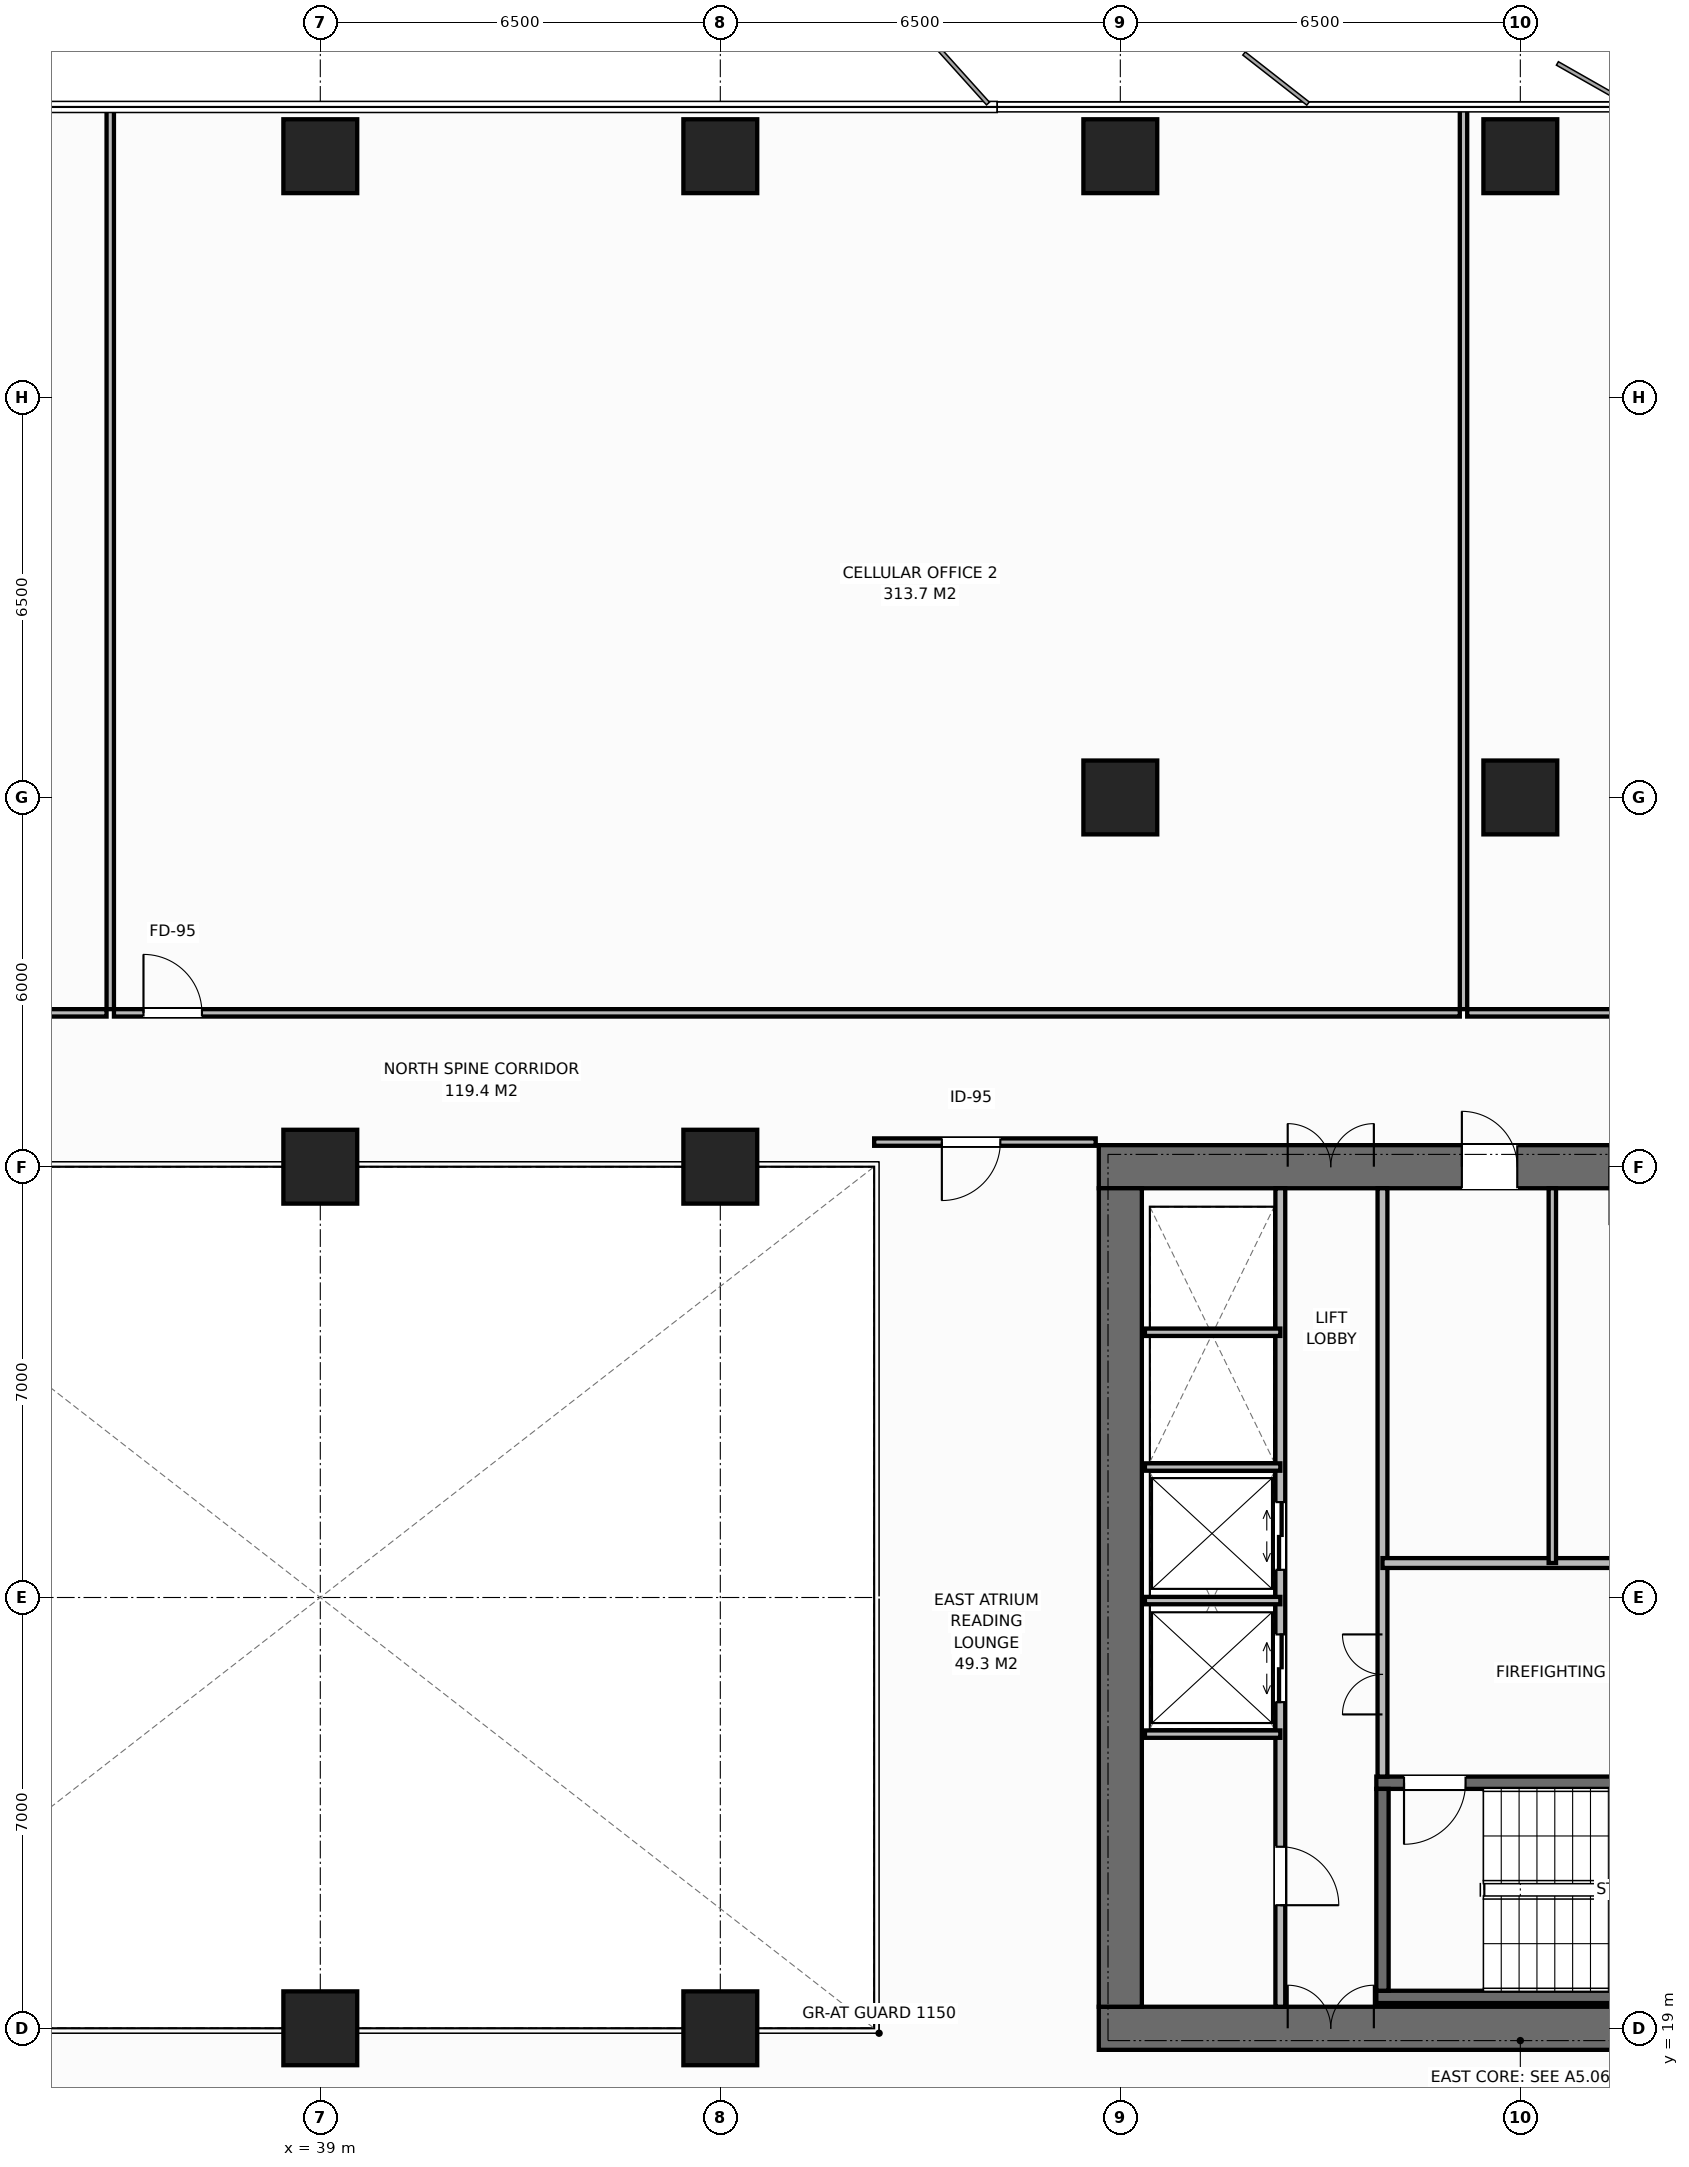
"""IFC4 building model, lengths in metres.
Left out: names, types, materials, properties, quantities, classifications, styles, units other than length and angle.
Written with IfcOpenShell. Run it as: python <this file> out.ifc"""

import sys

from ifc_helpers import new_model, si_unit, direction, frame, frame_2d, origin, origin_2d, place, context, subcontext, project, spatial, rectangle, extrude, element, fill, save


model = new_model("IFC4")
c1 = context("Model", 3, precision=1e-05, world=origin(), true_north=direction((0.0, 1.0)))
c2 = subcontext(c1, "Body", "Model", "MODEL_VIEW")
j1 = project(units=[si_unit("LENGTHUNIT", "METRE"), si_unit("PLANEANGLEUNIT", "RADIAN")], contexts=[c1])
p1 = place(None, origin())
s1 = spatial("IfcSite", under=j1, at=p1, CompositionType="ELEMENT")
p2 = place(p1, origin())
s2 = spatial("IfcBuilding", under=s1, at=p2, CompositionType="ELEMENT")
p3 = place(p2, frame((0.0, 0.0, 101.2)))
s3 = spatial("IfcBuildingStorey", under=s2, at=p3, CompositionType="ELEMENT", Elevation=101.2)
p4 = place(p3, frame((51.65, 19.0, 0.0), z_axis=(0.0, 0.0, 1.0), x_axis=(1.0, 0.0, 0.0)))
e1 = element("IfcWall", 1, at=p4, inside=s3, PredefinedType="SHEAR", context=c2, shape_type="SweptSolid", body=[
    extrude(rectangle(XDim=13.7, YDim=0.7, at=frame_2d((6.85, 0.0))), origin(), (0.0, 0.0, 1.0), 3.8),
])
p5 = place(p4, frame((3.07, 0.0, 0.0)))
e2 = element("IfcOpeningElement", 2, at=p5, cuts=e1, PredefinedType="OPENING", context=c2, shape_type="SweptSolid", body=[
    extrude(rectangle(XDim=1.4, YDim=2.2, at=frame_2d((0.7, 1.1))), frame((0.0, 0.36, 0.0), z_axis=(0.0, -1.0, 0.0), x_axis=(1.0, 0.0, 0.0)), (0.0, 0.0, 1.0), 0.72),
])
p6 = place(p3, frame((51.65, 33.0, 0.0), z_axis=(0.0, 0.0, 1.0), x_axis=(1.0, 0.0, 0.0)))
e3 = element("IfcWall", 3, at=p6, inside=s3, PredefinedType="SHEAR", context=c2, shape_type="SweptSolid", body=[
    extrude(rectangle(XDim=13.7, YDim=0.7, at=frame_2d((6.85, 0.0))), origin(), (0.0, 0.0, 1.0), 3.8),
])
p7 = place(p6, frame((3.07, 0.0, 0.0)))
e4 = element("IfcOpeningElement", 4, at=p7, cuts=e3, PredefinedType="OPENING", context=c2, shape_type="SweptSolid", body=[
    extrude(rectangle(XDim=1.4, YDim=2.2, at=frame_2d((0.7, 1.1))), frame((0.0, 0.36, 0.0), z_axis=(0.0, -1.0, 0.0), x_axis=(1.0, 0.0, 0.0)), (0.0, 0.0, 1.0), 0.72),
])
p8 = place(p6, frame((10.95, 0.0, 0.0)))
e5 = element("IfcOpeningElement", 5, at=p8, cuts=e3, PredefinedType="OPENING", context=c2, shape_type="SweptSolid", body=[
    extrude(rectangle(XDim=0.9, YDim=2.15, at=frame_2d((0.45, 1.075))), frame((0.0, 0.36, 0.0), z_axis=(0.0, -1.0, 0.0), x_axis=(1.0, 0.0, 0.0)), (0.0, 0.0, 1.0), 0.72),
])
p9 = place(p6, frame((5.9, 0.0, 0.0)))
e6 = element("IfcOpeningElement", 6, at=p9, cuts=e3, PredefinedType="OPENING", context=c2, shape_type="SweptSolid", body=[
    extrude(rectangle(XDim=0.9, YDim=2.15, at=frame_2d((0.45, 1.075))), frame((0.0, 0.36, 0.0), z_axis=(0.0, -1.0, 0.0), x_axis=(1.0, 0.0, 0.0)), (0.0, 0.0, 1.0), 0.72),
])
p10 = place(p6, frame((8.3, 0.0, 0.0)))
e7 = element("IfcOpeningElement", 7, at=p10, cuts=e3, PredefinedType="OPENING", context=c2, shape_type="SweptSolid", body=[
    extrude(rectangle(XDim=0.95, YDim=2.15, at=frame_2d((0.475, 1.075))), frame((0.0, 0.36, 0.0), z_axis=(0.0, -1.0, 0.0), x_axis=(1.0, 0.0, 0.0)), (0.0, 0.0, 1.0), 0.72),
])
p11 = place(p3, frame((52.0, 19.35, 0.0), z_axis=(0.0, 0.0, 1.0), x_axis=(0.0, 1.0, 0.0)))
e8 = element("IfcWall", 8, at=p11, inside=s3, PredefinedType="SHEAR", context=c2, shape_type="SweptSolid", body=[
    extrude(rectangle(XDim=13.3, YDim=0.7, at=frame_2d((6.65, 0.0))), origin(), (0.0, 0.0, 1.0), 3.8),
])
p12 = place(p3, frame((56.16, 19.51, 0.0), z_axis=(0.0, 0.0, 1.0), x_axis=(1.0, 0.0, 0.0)))
e9 = element("IfcWall", 9, at=p12, inside=s3, PredefinedType="SHEAR", context=c2, shape_type="SweptSolid", body=[
    extrude(rectangle(XDim=8.43, YDim=0.2, at=frame_2d((4.215, 0.0))), origin(), (0.0, 0.0, 1.0), 3.8),
])
p13 = place(p3, frame((56.16, 22.99, 0.0), z_axis=(0.0, 0.0, 1.0), x_axis=(1.0, 0.0, 0.0)))
e10 = element("IfcWall", 10, at=p13, inside=s3, PredefinedType="SHEAR", context=c2, shape_type="SweptSolid", body=[
    extrude(rectangle(XDim=8.43, YDim=0.2, at=frame_2d((4.215, 0.0))), origin(), (0.0, 0.0, 1.0), 3.8),
])
p14 = place(p13, frame((0.45, 0.0, 0.0)))
e11 = element("IfcOpeningElement", 11, at=p14, cuts=e10, PredefinedType="OPENING", context=c2, shape_type="SweptSolid", body=[
    extrude(rectangle(XDim=1.0, YDim=2.15, at=frame_2d((0.5, 1.075))), frame((0.0, 0.11, 0.0), z_axis=(0.0, -1.0, 0.0), x_axis=(1.0, 0.0, 0.0)), (0.0, 0.0, 1.0), 0.22),
])
p15 = place(p3, frame((56.26, 19.61, 0.0), z_axis=(0.0, 0.0, 1.0), x_axis=(0.0, 1.0, 0.0)))
e12 = element("IfcWall", 12, at=p15, inside=s3, PredefinedType="SHEAR", context=c2, shape_type="SweptSolid", body=[
    extrude(rectangle(XDim=3.28, YDim=0.2, at=frame_2d((1.64, 0.0))), origin(), (0.0, 0.0, 1.0), 3.8),
])
for number, where, z_axis, x_axis in (
    (13, (58.5, 39.0, 0.0), (0.0, 0.0, 1.0), (1.0, 0.0, 0.0)),
    (14, (39.0, 19.0, 0.0), (0.0, 0.0, 1.0), (1.0, 0.0, 0.0)),
    (15, (39.0, 33.0, 0.0), (0.0, 0.0, 1.0), (1.0, 0.0, 0.0)),
    (16, (45.5, 19.0, 0.0), (0.0, 0.0, 1.0), (1.0, 0.0, 0.0)),
    (17, (45.5, 33.0, 0.0), (0.0, 0.0, 1.0), (1.0, 0.0, 0.0)),
    (18, (52.0, 39.0, 0.0), (0.0, 0.0, 1.0), (1.0, 0.0, 0.0)),
    (19, (39.0, 49.42, 0.0), (0.0, 0.0, 1.0), (1.0, 0.0, 0.0)),
    (20, (45.5, 49.42, 0.0), (0.0, 0.0, 1.0), (1.0, 0.0, 0.0)),
    (21, (52.0, 49.42, 0.0), (0.0, 0.0, 1.0), (1.0, 0.0, 0.0)),
    (22, (58.5, 49.42, 0.0), (0.0, 0.0, 1.0), (1.0, 0.0, 0.0)),
):
    element("IfcColumn", number, at=place(p3, frame(where, z_axis=z_axis, x_axis=x_axis)), inside=s3, PredefinedType="COLUMN", context=c2, shape_type="SweptSolid", body=[
        extrude(rectangle(XDim=1.2, YDim=1.2, at=origin_2d()), origin(), (0.0, 0.0, 1.0), 3.8),
    ])
p16 = place(p3, frame((54.6, 19.35, 0.0), z_axis=(0.0, 0.0, 1.0), x_axis=(0.0, 1.0, 0.0)))
e23 = element("IfcWall", 23, at=p16, inside=s3, PredefinedType="STANDARD", context=c2, shape_type="SweptSolid", body=[
    extrude(rectangle(XDim=13.3, YDim=0.16, at=frame_2d((6.65, 0.0))), origin(), (0.0, 0.0, 1.0), 3.565),
])
p17 = place(p16, frame((1.65, 0.0, 0.0)))
e24 = element("IfcOpeningElement", 24, at=p17, cuts=e23, PredefinedType="OPENING", context=c2, shape_type="SweptSolid", body=[
    extrude(rectangle(XDim=0.95, YDim=2.15, at=frame_2d((0.475, 1.075))), frame((0.0, 0.09, 0.0), z_axis=(0.0, -1.0, 0.0), x_axis=(1.0, 0.0, 0.0)), (0.0, 0.0, 1.0), 0.18),
])
p18 = place(p16, frame((4.95, 0.0, 0.0)))
e25 = element("IfcOpeningElement", 25, at=p18, cuts=e23, PredefinedType="OPENING", context=c2, shape_type="SweptSolid", body=[
    extrude(rectangle(XDim=1.1, YDim=2.2, at=frame_2d((0.55, 1.1))), frame((0.0, 0.09, 0.0), z_axis=(0.0, -1.0, 0.0), x_axis=(1.0, 0.0, 0.0)), (0.0, 0.0, 1.0), 0.18),
])
p19 = place(p16, frame((7.1, 0.0, 0.0)))
e26 = element("IfcOpeningElement", 26, at=p19, cuts=e23, PredefinedType="OPENING", context=c2, shape_type="SweptSolid", body=[
    extrude(rectangle(XDim=1.1, YDim=2.2, at=frame_2d((0.55, 1.1))), frame((0.0, 0.09, 0.0), z_axis=(0.0, -1.0, 0.0), x_axis=(1.0, 0.0, 0.0)), (0.0, 0.0, 1.0), 0.18),
])
p20 = place(p3, frame((56.26, 23.09, 0.0), z_axis=(0.0, 0.0, 1.0), x_axis=(0.0, 1.0, 0.0)))
e27 = element("IfcWall", 27, at=p20, inside=s3, PredefinedType="STANDARD", context=c2, shape_type="SweptSolid", body=[
    extrude(rectangle(XDim=9.56, YDim=0.16, at=frame_2d((4.78, 0.0))), origin(), (0.0, 0.0, 1.0), 3.565),
])
p21 = place(p20, frame((1.01, 0.0, 0.0)))
e28 = element("IfcOpeningElement", 28, at=p21, cuts=e27, PredefinedType="OPENING", context=c2, shape_type="SweptSolid", body=[
    extrude(rectangle(XDim=1.3, YDim=2.2, at=frame_2d((0.65, 1.1))), frame((0.0, 0.09, 0.0), z_axis=(0.0, -1.0, 0.0), x_axis=(1.0, 0.0, 0.0)), (0.0, 0.0, 1.0), 0.18),
])
for number, where, z_axis, x_axis in (
    (29, (52.4, 23.78, 0.0), (0.0, 0.0, 1.0), (1.0, 0.0, 0.0)),
    (30, (52.4, 25.95, 0.0), (0.0, 0.0, 1.0), (1.0, 0.0, 0.0)),
    (31, (52.4, 28.12, 0.0), (0.0, 0.0, 1.0), (1.0, 0.0, 0.0)),
    (32, (52.4, 30.31, 0.0), (0.0, 0.0, 1.0), (1.0, 0.0, 0.0)),
):
    element("IfcWall", number, at=place(p3, frame(where, z_axis=z_axis, x_axis=x_axis)), inside=s3, PredefinedType="PARTITIONING", context=c2, shape_type="SweptSolid", body=[
        extrude(rectangle(XDim=2.2, YDim=0.12, at=frame_2d((1.1, 0.0))), origin(), (0.0, 0.0, 1.0), 3.565),
    ])
p22 = place(p3, frame((56.26, 26.56, 0.0), z_axis=(0.0, 0.0, 1.0), x_axis=(1.0, 0.0, 0.0)))
e33 = element("IfcWall", 33, at=p22, inside=s3, PredefinedType="STANDARD", context=c2, shape_type="SweptSolid", body=[
    extrude(rectangle(XDim=8.34, YDim=0.16, at=frame_2d((4.17, 0.0))), origin(), (0.0, 0.0, 1.0), 3.565),
])
p23 = place(p3, frame((59.02, 26.56, 0.0), z_axis=(0.0, 0.0, 1.0), x_axis=(0.0, 1.0, 0.0)))
e34 = element("IfcWall", 34, at=p23, inside=s3, PredefinedType="PARTITIONING", context=c2, shape_type="SweptSolid", body=[
    extrude(rectangle(XDim=6.09, YDim=0.12, at=frame_2d((3.045, 0.0))), origin(), (0.0, 0.0, 1.0), 3.565),
])
p24 = place(p3, frame((48.0, 33.4, 0.0), z_axis=(0.0, 0.0, 1.0), x_axis=(1.0, 0.0, 0.0)))
e35 = element("IfcWall", 35, at=p24, inside=s3, PredefinedType="PARTITIONING", context=c2, shape_type="SweptSolid", body=[
    extrude(rectangle(XDim=3.6, YDim=0.12, at=frame_2d((1.8, 0.0))), origin(), (0.0, 0.0, 1.0), 3.565),
])
p25 = place(p24, frame((1.1, 0.0, 0.0)))
e36 = element("IfcOpeningElement", 36, at=p25, cuts=e35, PredefinedType="OPENING", context=c2, shape_type="SweptSolid", body=[
    extrude(rectangle(XDim=0.95, YDim=2.15, at=frame_2d((0.475, 1.075))), frame((0.0, 0.07, 0.0), z_axis=(0.0, -1.0, 0.0), x_axis=(1.0, 0.0, 0.0)), (0.0, 0.0, 1.0), 0.14),
])
p26 = place(p3, frame((35.587, 35.56, 0.0), z_axis=(0.0, 0.0, 1.0), x_axis=(0.0, 1.0, 0.0)))
e37 = element("IfcWall", 37, at=p26, inside=s3, PredefinedType="PARTITIONING", context=c2, shape_type="SweptSolid", body=[
    extrude(rectangle(XDim=14.72, YDim=0.12, at=frame_2d((7.36, 0.0))), origin(), (0.0, 0.0, 1.0), 3.565),
])
p27 = place(p3, frame((21.438, 35.5, 0.0), z_axis=(0.0, 0.0, 1.0), x_axis=(1.0, 0.0, 0.0)))
e38 = element("IfcWall", 38, at=p27, inside=s3, PredefinedType="PARTITIONING", context=c2, shape_type="SweptSolid", body=[
    extrude(rectangle(XDim=14.088, YDim=0.12, at=frame_2d((7.044, 0.0))), origin(), (0.0, 0.0, 1.0), 3.565),
])
p28 = place(p27, frame((6.569, 0.0, 0.0)))
e39 = element("IfcOpeningElement", 39, at=p28, cuts=e38, PredefinedType="OPENING", context=c2, shape_type="SweptSolid", body=[
    extrude(rectangle(XDim=0.95, YDim=2.15, at=frame_2d((0.475, 1.075))), frame((0.0, 0.07, 0.0), z_axis=(0.0, -1.0, 0.0), x_axis=(1.0, 0.0, 0.0)), (0.0, 0.0, 1.0), 0.14),
])
p29 = place(p3, frame((57.577, 35.56, 0.0), z_axis=(0.0, 0.0, 1.0), x_axis=(0.0, 1.0, 0.0)))
e40 = element("IfcWall", 40, at=p29, inside=s3, PredefinedType="PARTITIONING", context=c2, shape_type="SweptSolid", body=[
    extrude(rectangle(XDim=14.72, YDim=0.12, at=frame_2d((7.36, 0.0))), origin(), (0.0, 0.0, 1.0), 3.565),
])
p30 = place(p3, frame((35.647, 35.5, 0.0), z_axis=(0.0, 0.0, 1.0), x_axis=(1.0, 0.0, 0.0)))
e41 = element("IfcWall", 41, at=p30, inside=s3, PredefinedType="PARTITIONING", context=c2, shape_type="SweptSolid", body=[
    extrude(rectangle(XDim=21.87, YDim=0.12, at=frame_2d((10.935, 0.0))), origin(), (0.0, 0.0, 1.0), 3.565),
])
p31 = place(p30, frame((0.48, 0.0, 0.0)))
e42 = element("IfcOpeningElement", 42, at=p31, cuts=e41, PredefinedType="OPENING", context=c2, shape_type="SweptSolid", body=[
    extrude(rectangle(XDim=0.95, YDim=2.15, at=frame_2d((0.475, 1.075))), frame((0.0, 0.07, 0.0), z_axis=(0.0, -1.0, 0.0), x_axis=(1.0, 0.0, 0.0)), (0.0, 0.0, 1.0), 0.14),
])
p32 = place(p3, frame((57.637, 35.5, 0.0), z_axis=(0.0, 0.0, 1.0), x_axis=(1.0, 0.0, 0.0)))
e43 = element("IfcWall", 43, at=p32, inside=s3, PredefinedType="PARTITIONING", context=c2, shape_type="SweptSolid", body=[
    extrude(rectangle(XDim=18.383, YDim=0.12, at=frame_2d((9.192, 0.0))), origin(), (0.0, 0.0, 1.0), 3.565),
])
p33 = place(p32, frame((4.507, 0.0, 0.0)))
e44 = element("IfcOpeningElement", 44, at=p33, cuts=e43, PredefinedType="OPENING", context=c2, shape_type="SweptSolid", body=[
    extrude(rectangle(XDim=0.95, YDim=2.15, at=frame_2d((0.475, 1.075))), frame((0.0, 0.07, 0.0), z_axis=(0.0, -1.0, 0.0), x_axis=(1.0, 0.0, 0.0)), (0.0, 0.0, 1.0), 0.14),
])
p34 = place(p5, origin())
e45 = element("IfcDoor", 45, at=p34, inside=s3, OperationType="DOUBLE_DOOR_SINGLE_SWING", PredefinedType="DOOR", context=c2, shape_type="SweptSolid", body=[
    extrude(rectangle(XDim=1.4, YDim=2.2, at=frame_2d((0.7, 1.1))), frame((0.0, 0.125, 0.0), z_axis=(0.0, -1.0, 0.0), x_axis=(1.0, 0.0, 0.0)), (0.0, 0.0, 1.0), 0.05),
])
fill(e2, e45)
p35 = place(p7, origin())
e46 = element("IfcDoor", 46, at=p35, inside=s3, OperationType="DOUBLE_DOOR_SINGLE_SWING", PredefinedType="DOOR", context=c2, shape_type="SweptSolid", body=[
    extrude(rectangle(XDim=1.4, YDim=2.2, at=frame_2d((0.7, 1.1))), frame((0.0, -0.075, 0.0), z_axis=(0.0, -1.0, 0.0), x_axis=(1.0, 0.0, 0.0)), (0.0, 0.0, 1.0), 0.05),
])
fill(e4, e46)
p36 = place(p17, origin())
e47 = element("IfcDoor", 47, at=p36, inside=s3, OperationType="SINGLE_SWING_RIGHT", PredefinedType="DOOR", context=c2, shape_type="SweptSolid", body=[
    extrude(rectangle(XDim=0.95, YDim=2.15, at=frame_2d((0.475, 1.075))), frame((0.0, 0.025, 0.0), z_axis=(0.0, -1.0, 0.0), x_axis=(1.0, 0.0, 0.0)), (0.0, 0.0, 1.0), 0.05),
])
fill(e24, e47)
p37 = place(p18, origin())
e48 = element("IfcDoor", 48, at=p37, inside=s3, OperationType="DOUBLE_DOOR_SLIDING", PredefinedType="DOOR", context=c2, shape_type="SweptSolid", body=[
    extrude(rectangle(XDim=1.1, YDim=2.2, at=frame_2d((0.55, 1.1))), frame((0.0, 0.025, 0.0), z_axis=(0.0, -1.0, 0.0), x_axis=(1.0, 0.0, 0.0)), (0.0, 0.0, 1.0), 0.05),
])
fill(e25, e48)
p38 = place(p19, origin())
e49 = element("IfcDoor", 49, at=p38, inside=s3, OperationType="DOUBLE_DOOR_SLIDING", PredefinedType="DOOR", context=c2, shape_type="SweptSolid", body=[
    extrude(rectangle(XDim=1.1, YDim=2.2, at=frame_2d((0.55, 1.1))), frame((0.0, 0.025, 0.0), z_axis=(0.0, -1.0, 0.0), x_axis=(1.0, 0.0, 0.0)), (0.0, 0.0, 1.0), 0.05),
])
fill(e26, e49)
p39 = place(p14, origin())
e50 = element("IfcDoor", 50, at=p39, inside=s3, OperationType="SINGLE_SWING_RIGHT", PredefinedType="DOOR", context=c2, shape_type="SweptSolid", body=[
    extrude(rectangle(XDim=1.0, YDim=2.15, at=frame_2d((0.5, 1.075))), frame((0.0, 0.025, 0.0), z_axis=(0.0, -1.0, 0.0), x_axis=(1.0, 0.0, 0.0)), (0.0, 0.0, 1.0), 0.05),
])
fill(e11, e50)
p40 = place(p21, origin())
e51 = element("IfcDoor", 51, at=p40, inside=s3, OperationType="DOUBLE_DOOR_SINGLE_SWING", PredefinedType="DOOR", context=c2, shape_type="SweptSolid", body=[
    extrude(rectangle(XDim=1.3, YDim=2.2, at=frame_2d((0.65, 1.1))), frame((0.0, 0.025, 0.0), z_axis=(0.0, -1.0, 0.0), x_axis=(1.0, 0.0, 0.0)), (0.0, 0.0, 1.0), 0.05),
])
fill(e28, e51)
p41 = place(p9, origin())
e52 = element("IfcDoor", 52, at=p41, inside=s3, OperationType="SINGLE_SWING_LEFT", PredefinedType="DOOR", context=c2, shape_type="SweptSolid", body=[
    extrude(rectangle(XDim=0.9, YDim=2.15, at=frame_2d((0.45, 1.075))), frame((0.0, -0.075, 0.0), z_axis=(0.0, -1.0, 0.0), x_axis=(1.0, 0.0, 0.0)), (0.0, 0.0, 1.0), 0.05),
])
fill(e6, e52)
p42 = place(p25, origin())
e53 = element("IfcDoor", 53, at=p42, inside=s3, OperationType="SINGLE_SWING_RIGHT", PredefinedType="DOOR", context=c2, shape_type="SweptSolid", body=[
    extrude(rectangle(XDim=0.95, YDim=2.15, at=frame_2d((0.475, 1.075))), frame((0.0, 0.025, 0.0), z_axis=(0.0, -1.0, 0.0), x_axis=(1.0, 0.0, 0.0)), (0.0, 0.0, 1.0), 0.05),
])
fill(e36, e53)
p43 = place(p31, origin())
e54 = element("IfcDoor", 54, at=p43, inside=s3, OperationType="SINGLE_SWING_LEFT", PredefinedType="DOOR", context=c2, shape_type="SweptSolid", body=[
    extrude(rectangle(XDim=0.95, YDim=2.15, at=frame_2d((0.475, 1.075))), frame((0.0, 0.025, 0.0), z_axis=(0.0, -1.0, 0.0), x_axis=(1.0, 0.0, 0.0)), (0.0, 0.0, 1.0), 0.05),
])
fill(e42, e54)
save(model, sys.argv[1])
